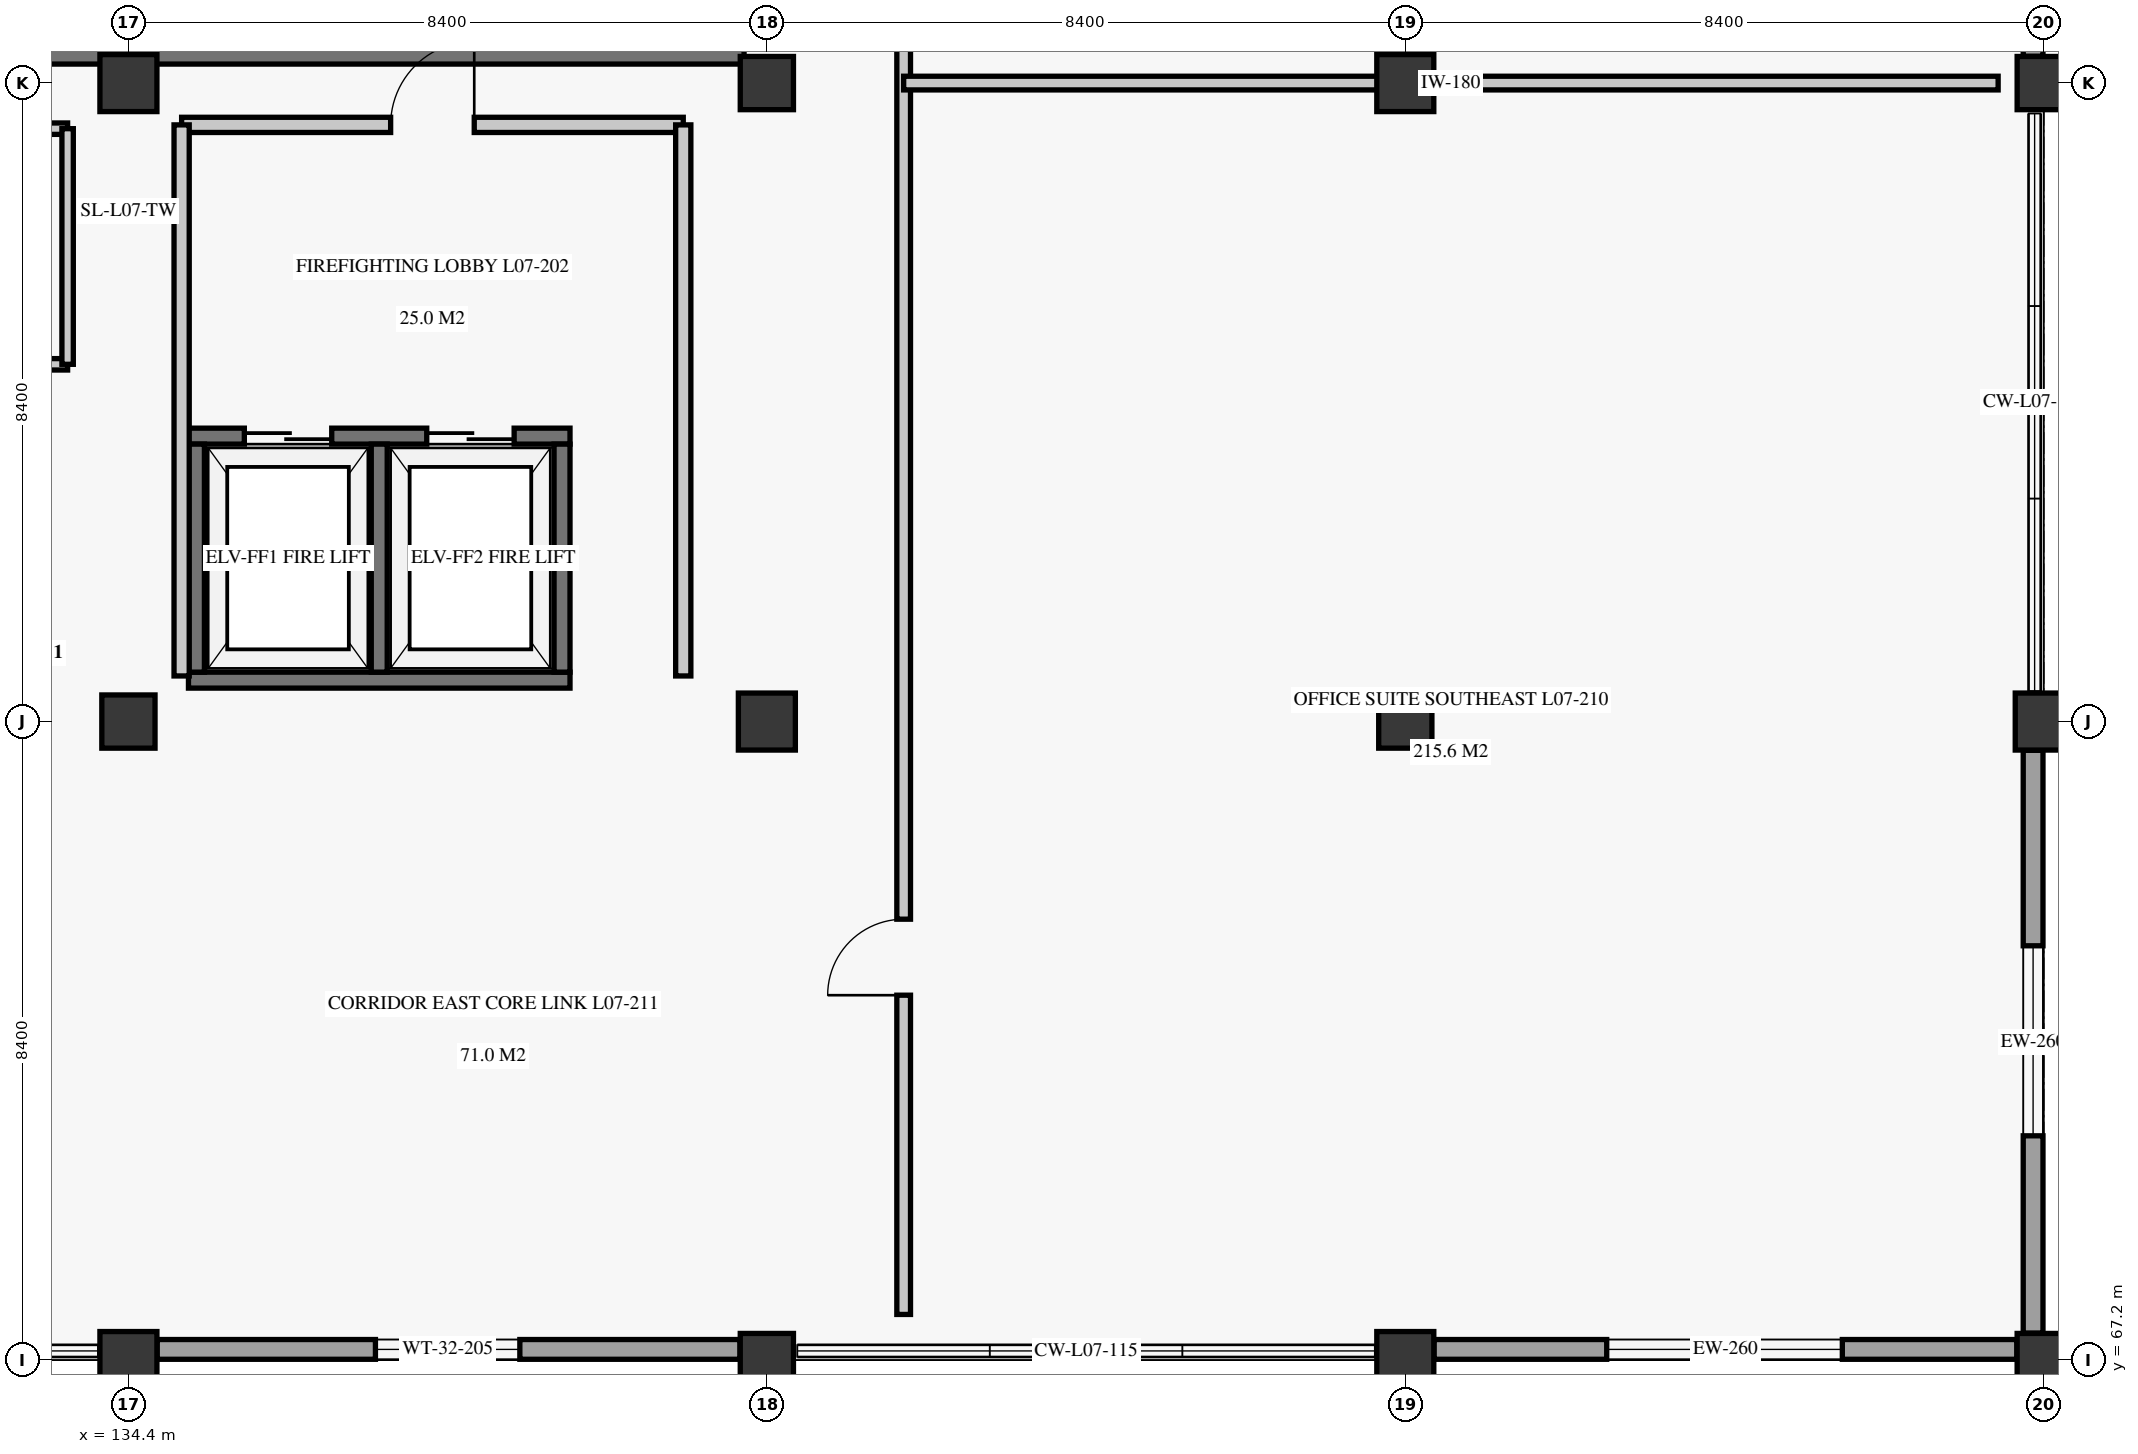
"""IFC4 building model, lengths in metres.
Left out: names, types, materials, properties, quantities, classifications, styles, units other than length and angle.
Written with IfcOpenShell. Run it as: python <this file> out.ifc"""

import sys

from ifc_helpers import new_model, si_unit, direction, frame, frame_2d, origin, origin_2d, place, context, subcontext, project, spatial, rectangle, extrude, element, fill, save


model = new_model("IFC4")
c1 = context("Model", 3, precision=1e-05, world=origin(), true_north=direction((0.0, 1.0)))
c2 = subcontext(c1, "Body", "Model", "MODEL_VIEW")
j1 = project(units=[si_unit("LENGTHUNIT", "METRE"), si_unit("PLANEANGLEUNIT", "RADIAN")], contexts=[c1])
p1 = place(None, origin())
s1 = spatial("IfcSite", under=j1, at=p1, CompositionType="ELEMENT")
p2 = place(p1, origin())
s2 = spatial("IfcBuilding", under=s1, at=p2, CompositionType="ELEMENT")
p3 = place(p2, frame((0.0, 0.0, 30.7)))
s3 = spatial("IfcBuildingStorey", under=s2, at=p3, CompositionType="ELEMENT", Elevation=30.7)
p4 = place(p3, frame((134.4, 67.2, 0.0), z_axis=(0.0, 0.0, 1.0), x_axis=(1.0, 0.0, 0.0)))
e1 = element("IfcColumn", 1, at=p4, inside=s3, PredefinedType="COLUMN", context=c2, shape_type="SweptSolid", body=[
    extrude(rectangle(XDim=0.75, YDim=0.75, at=origin_2d()), origin(), (0.0, 0.0, 1.0), 3.72),
])
p5 = place(p3, frame((134.4, 75.6, 0.0), z_axis=(0.0, 0.0, 1.0), x_axis=(1.0, 0.0, 0.0)))
e2 = element("IfcColumn", 2, at=p5, inside=s3, PredefinedType="COLUMN", context=c2, shape_type="SweptSolid", body=[
    extrude(rectangle(XDim=0.7, YDim=0.7, at=origin_2d()), origin(), (0.0, 0.0, 1.0), 3.72),
])
p6 = place(p3, frame((134.4, 84.0, 0.0), z_axis=(0.0, 0.0, 1.0), x_axis=(1.0, 0.0, 0.0)))
e3 = element("IfcColumn", 3, at=p6, inside=s3, PredefinedType="COLUMN", context=c2, shape_type="SweptSolid", body=[
    extrude(rectangle(XDim=0.75, YDim=0.75, at=origin_2d()), origin(), (0.0, 0.0, 1.0), 3.72),
])
p7 = place(p3, frame((142.8, 67.2, 0.0), z_axis=(0.0, 0.0, 1.0), x_axis=(1.0, 0.0, 0.0)))
e4 = element("IfcColumn", 4, at=p7, inside=s3, PredefinedType="COLUMN", context=c2, shape_type="SweptSolid", body=[
    extrude(rectangle(XDim=0.7, YDim=0.7, at=origin_2d()), origin(), (0.0, 0.0, 1.0), 3.72),
])
p8 = place(p3, frame((142.8, 75.6, 0.0), z_axis=(0.0, 0.0, 1.0), x_axis=(1.0, 0.0, 0.0)))
e5 = element("IfcColumn", 5, at=p8, inside=s3, PredefinedType="COLUMN", context=c2, shape_type="SweptSolid", body=[
    extrude(rectangle(XDim=0.75, YDim=0.75, at=origin_2d()), origin(), (0.0, 0.0, 1.0), 3.72),
])
p9 = place(p3, frame((142.8, 84.0, 0.0), z_axis=(0.0, 0.0, 1.0), x_axis=(1.0, 0.0, 0.0)))
e6 = element("IfcColumn", 6, at=p9, inside=s3, PredefinedType="COLUMN", context=c2, shape_type="SweptSolid", body=[
    extrude(rectangle(XDim=0.7, YDim=0.7, at=origin_2d()), origin(), (0.0, 0.0, 1.0), 3.72),
])
p10 = place(p3, frame((151.2, 67.2, 0.0), z_axis=(0.0, 0.0, 1.0), x_axis=(1.0, 0.0, 0.0)))
e7 = element("IfcColumn", 7, at=p10, inside=s3, PredefinedType="COLUMN", context=c2, shape_type="SweptSolid", body=[
    extrude(rectangle(XDim=0.75, YDim=0.75, at=origin_2d()), origin(), (0.0, 0.0, 1.0), 3.72),
])
p11 = place(p3, frame((151.2, 75.6, 0.0), z_axis=(0.0, 0.0, 1.0), x_axis=(1.0, 0.0, 0.0)))
e8 = element("IfcColumn", 8, at=p11, inside=s3, PredefinedType="COLUMN", context=c2, shape_type="SweptSolid", body=[
    extrude(rectangle(XDim=0.7, YDim=0.7, at=origin_2d()), origin(), (0.0, 0.0, 1.0), 3.72),
])
p12 = place(p3, frame((151.2, 84.0, 0.0), z_axis=(0.0, 0.0, 1.0), x_axis=(1.0, 0.0, 0.0)))
e9 = element("IfcColumn", 9, at=p12, inside=s3, PredefinedType="COLUMN", context=c2, shape_type="SweptSolid", body=[
    extrude(rectangle(XDim=0.75, YDim=0.75, at=origin_2d()), origin(), (0.0, 0.0, 1.0), 3.72),
])
p13 = place(p3, frame((159.6, 67.2, 0.0), z_axis=(0.0, 0.0, 1.0), x_axis=(1.0, 0.0, 0.0)))
e10 = element("IfcColumn", 10, at=p13, inside=s3, PredefinedType="COLUMN", context=c2, shape_type="SweptSolid", body=[
    extrude(rectangle(XDim=0.7, YDim=0.7, at=origin_2d()), origin(), (0.0, 0.0, 1.0), 3.72),
])
p14 = place(p3, frame((159.6, 75.6, 0.0), z_axis=(0.0, 0.0, 1.0), x_axis=(1.0, 0.0, 0.0)))
e11 = element("IfcColumn", 11, at=p14, inside=s3, PredefinedType="COLUMN", context=c2, shape_type="SweptSolid", body=[
    extrude(rectangle(XDim=0.75, YDim=0.75, at=origin_2d()), origin(), (0.0, 0.0, 1.0), 3.72),
])
p15 = place(p3, frame((159.6, 84.0, 0.0), z_axis=(0.0, 0.0, 1.0), x_axis=(1.0, 0.0, 0.0)))
e12 = element("IfcColumn", 12, at=p15, inside=s3, PredefinedType="COLUMN", context=c2, shape_type="SweptSolid", body=[
    extrude(rectangle(XDim=0.7, YDim=0.7, at=origin_2d()), origin(), (0.0, 0.0, 1.0), 3.72),
])
p16 = place(p3, frame((134.778, 67.34, 0.0), z_axis=(0.0, 0.0, 1.0), x_axis=(1.0, 0.0, 0.0)))
e13 = element("IfcWall", 13, at=p16, inside=s3, PredefinedType="SOLIDWALL", context=c2, shape_type="SweptSolid", body=[
    extrude(rectangle(XDim=7.668, YDim=0.26, at=frame_2d((3.834, 0.0))), origin(), (0.0, 0.0, 1.0), 3.04),
])
p17 = place(p16, frame((2.872, 0.0, 0.85)))
e14 = element("IfcOpeningElement", 14, at=p17, cuts=e13, PredefinedType="OPENING", context=c2, shape_type="SweptSolid", body=[
    extrude(rectangle(XDim=1.9, YDim=1.75, at=frame_2d((0.95, 0.875))), frame((0.0, 0.14, 0.0), z_axis=(0.0, -1.0, 0.0), x_axis=(1.0, 0.0, 0.0)), (0.0, 0.0, 1.0), 0.28),
])
p18 = place(p3, frame((151.578, 67.34, 0.0), z_axis=(0.0, 0.0, 1.0), x_axis=(1.0, 0.0, 0.0)))
e15 = element("IfcWall", 15, at=p18, inside=s3, PredefinedType="SOLIDWALL", context=c2, shape_type="SweptSolid", body=[
    extrude(rectangle(XDim=7.668, YDim=0.26, at=frame_2d((3.834, 0.0))), origin(), (0.0, 0.0, 1.0), 3.04),
])
p19 = place(p18, frame((2.272, 0.0, 0.85)))
e16 = element("IfcOpeningElement", 16, at=p19, cuts=e15, PredefinedType="OPENING", context=c2, shape_type="SweptSolid", body=[
    extrude(rectangle(XDim=3.1, YDim=1.85, at=frame_2d((1.55, 0.925))), frame((0.0, 0.14, 0.0), z_axis=(0.0, -1.0, 0.0), x_axis=(1.0, 0.0, 0.0)), (0.0, 0.0, 1.0), 0.28),
])
p20 = place(p3, frame((159.46, 67.554, 0.0), z_axis=(0.0, 0.0, 1.0), x_axis=(0.0, 1.0, 0.0)))
e17 = element("IfcWall", 17, at=p20, inside=s3, PredefinedType="SOLIDWALL", context=c2, shape_type="SweptSolid", body=[
    extrude(rectangle(XDim=7.668, YDim=0.26, at=frame_2d((3.834, 0.0))), origin(), (0.0, 0.0, 1.0), 3.04),
])
p21 = place(p20, frame((2.596, 0.0, 0.85)))
e18 = element("IfcOpeningElement", 18, at=p21, cuts=e17, PredefinedType="OPENING", context=c2, shape_type="SweptSolid", body=[
    extrude(rectangle(XDim=2.5, YDim=1.8, at=frame_2d((1.25, 0.9))), frame((0.0, 0.14, 0.0), z_axis=(0.0, -1.0, 0.0), x_axis=(1.0, 0.0, 0.0)), (0.0, 0.0, 1.0), 0.28),
])
p22 = place(p3, frame((159.46, 84.352, 0.0), z_axis=(0.0, 0.0, 1.0), x_axis=(0.0, 1.0, 0.0)))
e19 = element("IfcWall", 19, at=p22, inside=s3, PredefinedType="SOLIDWALL", context=c2, shape_type="SweptSolid", body=[
    extrude(rectangle(XDim=7.67, YDim=0.26, at=frame_2d((3.835, 0.0))), origin(), (0.0, 0.0, 1.0), 3.04),
])
p23 = place(p22, frame((3.148, 0.0, 0.85)))
e20 = element("IfcOpeningElement", 20, at=p23, cuts=e19, PredefinedType="OPENING", context=c2, shape_type="SweptSolid", body=[
    extrude(rectangle(XDim=1.4, YDim=1.7, at=frame_2d((0.7, 0.85))), frame((0.0, 0.14, 0.0), z_axis=(0.0, -1.0, 0.0), x_axis=(1.0, 0.0, 0.0)), (0.0, 0.0, 1.0), 0.28),
])
p24 = place(p3, frame((132.75, 84.425, 0.0), z_axis=(0.0, 0.0, 1.0), x_axis=(1.0, 0.0, 0.0)))
e21 = element("IfcWall", 21, at=p24, inside=s3, PredefinedType="SHEAR", context=c2, shape_type="SweptSolid", body=[
    extrude(rectangle(XDim=9.75, YDim=0.35, at=frame_2d((4.875, 0.0))), origin(), (0.0, 0.0, 1.0), 3.72),
])
p25 = place(p3, frame((135.19, 76.145, 0.0), z_axis=(0.0, 0.0, 1.0), x_axis=(1.0, 0.0, 0.0)))
e22 = element("IfcWall", 22, at=p25, inside=s3, PredefinedType="SHEAR", context=c2, shape_type="SweptSolid", body=[
    extrude(rectangle(XDim=5.02, YDim=0.21, at=frame_2d((2.51, 0.0))), origin(), (0.0, 0.0, 1.0), 3.72),
])
p26 = place(p3, frame((135.19, 79.355, 0.0), z_axis=(0.0, 0.0, 1.0), x_axis=(1.0, 0.0, 0.0)))
e23 = element("IfcWall", 23, at=p26, inside=s3, PredefinedType="SHEAR", context=c2, shape_type="SweptSolid", body=[
    extrude(rectangle(XDim=5.02, YDim=0.21, at=frame_2d((2.51, 0.0))), origin(), (0.0, 0.0, 1.0), 3.72),
])
p27 = place(p26, frame((0.735, 0.0, 0.0)))
e24 = element("IfcOpeningElement", 24, at=p27, cuts=e23, PredefinedType="OPENING", context=c2, shape_type="SweptSolid", body=[
    extrude(rectangle(XDim=1.15, YDim=2.2, at=frame_2d((0.575, 1.1))), frame((0.0, 0.115, 0.0), z_axis=(0.0, -1.0, 0.0), x_axis=(1.0, 0.0, 0.0)), (0.0, 0.0, 1.0), 0.23),
])
p28 = place(p26, frame((3.135, 0.0, 0.0)))
e25 = element("IfcOpeningElement", 25, at=p28, cuts=e23, PredefinedType="OPENING", context=c2, shape_type="SweptSolid", body=[
    extrude(rectangle(XDim=1.15, YDim=2.2, at=frame_2d((0.575, 1.1))), frame((0.0, 0.115, 0.0), z_axis=(0.0, -1.0, 0.0), x_axis=(1.0, 0.0, 0.0)), (0.0, 0.0, 1.0), 0.23),
])
for number, where, z_axis, x_axis in (
    (26, (135.295, 76.25, 0.0), (0.0, 0.0, 1.0), (0.0, 1.0, 0.0)),
    (27, (140.105, 76.25, 0.0), (0.0, 0.0, 1.0), (0.0, 1.0, 0.0)),
    (28, (137.7, 76.25, 0.0), (0.0, 0.0, 1.0), (0.0, 1.0, 0.0)),
):
    element("IfcWall", number, at=place(p3, frame(where, z_axis=z_axis, x_axis=x_axis)), inside=s3, PredefinedType="SHEAR", context=c2, shape_type="SweptSolid", body=[
        extrude(rectangle(XDim=3.0, YDim=0.21, at=frame_2d((1.5, 0.0))), origin(), (0.0, 0.0, 1.0), 3.72),
    ])
p29 = place(p3, frame((135.1, 83.45, 0.0), z_axis=(0.0, 0.0, 1.0), x_axis=(1.0, 0.0, 0.0)))
e29 = element("IfcWall", 29, at=p29, inside=s3, PredefinedType="PARTITIONING", context=c2, shape_type="SweptSolid", body=[
    extrude(rectangle(XDim=6.6, YDim=0.2, at=frame_2d((3.3, 0.0))), origin(), (0.0, 0.0, 1.0), 3.34),
])
p30 = place(p29, frame((2.75, 0.0, 0.0)))
e30 = element("IfcOpeningElement", 30, at=p30, cuts=e29, PredefinedType="OPENING", context=c2, shape_type="SweptSolid", body=[
    extrude(rectangle(XDim=1.1, YDim=2.2, at=frame_2d((0.55, 1.1))), frame((0.0, 0.11, 0.0), z_axis=(0.0, -1.0, 0.0), x_axis=(1.0, 0.0, 0.0)), (0.0, 0.0, 1.0), 0.22),
])
for number, where, z_axis, x_axis in (
    (31, (135.1, 76.2, 0.0), (0.0, 0.0, 1.0), (0.0, 1.0, 0.0)),
    (32, (141.7, 76.2, 0.0), (0.0, 0.0, 1.0), (0.0, 1.0, 0.0)),
):
    element("IfcWall", number, at=place(p3, frame(where, z_axis=z_axis, x_axis=x_axis)), inside=s3, PredefinedType="PARTITIONING", context=c2, shape_type="SweptSolid", body=[
        extrude(rectangle(XDim=7.25, YDim=0.2, at=frame_2d((3.625, 0.0))), origin(), (0.0, 0.0, 1.0), 3.34),
    ])
p31 = place(p3, frame((129.1, 80.3, 0.0), z_axis=(0.0, 0.0, 1.0), x_axis=(1.0, 0.0, 0.0)))
e33 = element("IfcWall", 33, at=p31, inside=s3, PredefinedType="PARTITIONING", context=c2, shape_type="SweptSolid", body=[
    extrude(rectangle(XDim=4.5, YDim=0.15, at=frame_2d((2.25, 0.0))), origin(), (0.0, 0.0, 1.0), 3.34),
])
p32 = place(p31, frame((1.65, 0.0, 0.0)))
e34 = element("IfcOpeningElement", 34, at=p32, cuts=e33, PredefinedType="OPENING", context=c2, shape_type="SweptSolid", body=[
    extrude(rectangle(XDim=1.0, YDim=2.1, at=frame_2d((0.5, 1.05))), frame((0.0, 0.085, 0.0), z_axis=(0.0, -1.0, 0.0), x_axis=(1.0, 0.0, 0.0)), (0.0, 0.0, 1.0), 0.17),
])
p33 = place(p3, frame((129.1, 83.4, 0.0), z_axis=(0.0, 0.0, 1.0), x_axis=(1.0, 0.0, 0.0)))
e35 = element("IfcWall", 35, at=p33, inside=s3, PredefinedType="PARTITIONING", context=c2, shape_type="SweptSolid", body=[
    extrude(rectangle(XDim=4.5, YDim=0.15, at=frame_2d((2.25, 0.0))), origin(), (0.0, 0.0, 1.0), 3.34),
])
p34 = place(p3, frame((133.6, 80.3, 0.0), z_axis=(0.0, 0.0, 1.0), x_axis=(0.0, 1.0, 0.0)))
e36 = element("IfcWall", 36, at=p34, inside=s3, PredefinedType="PARTITIONING", context=c2, shape_type="SweptSolid", body=[
    extrude(rectangle(XDim=3.1, YDim=0.15, at=frame_2d((1.55, 0.0))), origin(), (0.0, 0.0, 1.0), 3.34),
])
p35 = place(p3, frame((144.6, 67.8, 0.0), z_axis=(0.0, 0.0, 1.0), x_axis=(0.0, 1.0, 0.0)))
e37 = element("IfcWall", 37, at=p35, inside=s3, PredefinedType="PARTITIONING", context=c2, shape_type="SweptSolid", body=[
    extrude(rectangle(XDim=32.4, YDim=0.18, at=frame_2d((16.2, 0.0))), origin(), (0.0, 0.0, 1.0), 3.34),
])
p36 = place(p35, frame((4.2, 0.0, 0.0)))
e38 = element("IfcOpeningElement", 38, at=p36, cuts=e37, PredefinedType="OPENING", context=c2, shape_type="SweptSolid", body=[
    extrude(rectangle(XDim=1.0, YDim=2.15, at=frame_2d((0.5, 1.075))), frame((0.0, 0.1, 0.0), z_axis=(0.0, -1.0, 0.0), x_axis=(1.0, 0.0, 0.0)), (0.0, 0.0, 1.0), 0.2),
])
p37 = place(p35, frame((21.4, 0.0, 0.0)))
e39 = element("IfcOpeningElement", 39, at=p37, cuts=e37, PredefinedType="OPENING", context=c2, shape_type="SweptSolid", body=[
    extrude(rectangle(XDim=1.0, YDim=2.15, at=frame_2d((0.5, 1.075))), frame((0.0, 0.1, 0.0), z_axis=(0.0, -1.0, 0.0), x_axis=(1.0, 0.0, 0.0)), (0.0, 0.0, 1.0), 0.2),
])
p38 = place(p3, frame((144.6, 84.0, 0.0), z_axis=(0.0, 0.0, 1.0), x_axis=(1.0, 0.0, 0.0)))
e40 = element("IfcWall", 40, at=p38, inside=s3, PredefinedType="PARTITIONING", context=c2, shape_type="SweptSolid", body=[
    extrude(rectangle(XDim=14.4, YDim=0.18, at=frame_2d((7.2, 0.0))), origin(), (0.0, 0.0, 1.0), 3.34),
])
p39 = place(p17, origin())
e41 = element("IfcWindow", 41, at=p39, inside=s3, PartitioningType="SINGLE_PANEL", PredefinedType="WINDOW", context=c2, shape_type="SweptSolid", body=[
    extrude(rectangle(XDim=1.9, YDim=1.75, at=frame_2d((0.95, 0.875))), frame((0.0, 0.03, 0.0), z_axis=(0.0, -1.0, 0.0), x_axis=(1.0, 0.0, 0.0)), (0.0, 0.0, 1.0), 0.06),
])
fill(e14, e41)
p40 = place(p19, origin())
e42 = element("IfcWindow", 42, at=p40, inside=s3, PartitioningType="SINGLE_PANEL", PredefinedType="WINDOW", context=c2, shape_type="SweptSolid", body=[
    extrude(rectangle(XDim=3.1, YDim=1.85, at=frame_2d((1.55, 0.925))), frame((0.0, 0.03, 0.0), z_axis=(0.0, -1.0, 0.0), x_axis=(1.0, 0.0, 0.0)), (0.0, 0.0, 1.0), 0.06),
])
fill(e16, e42)
p41 = place(p21, origin())
e43 = element("IfcWindow", 43, at=p41, inside=s3, PartitioningType="SINGLE_PANEL", PredefinedType="WINDOW", context=c2, shape_type="SweptSolid", body=[
    extrude(rectangle(XDim=2.5, YDim=1.8, at=frame_2d((1.25, 0.9))), frame((0.0, 0.03, 0.0), z_axis=(0.0, -1.0, 0.0), x_axis=(1.0, 0.0, 0.0)), (0.0, 0.0, 1.0), 0.06),
])
fill(e18, e43)
p42 = place(p27, origin())
e44 = element("IfcDoor", 44, at=p42, inside=s3, OperationType="DOUBLE_DOOR_SLIDING", PredefinedType="DOOR", context=c2, shape_type="SweptSolid", body=[
    extrude(rectangle(XDim=1.15, YDim=2.2, at=frame_2d((0.575, 1.1))), frame((0.0, 0.025, 0.0), z_axis=(0.0, -1.0, 0.0), x_axis=(1.0, 0.0, 0.0)), (0.0, 0.0, 1.0), 0.05),
])
fill(e24, e44)
p43 = place(p28, origin())
e45 = element("IfcDoor", 45, at=p43, inside=s3, OperationType="DOUBLE_DOOR_SLIDING", PredefinedType="DOOR", context=c2, shape_type="SweptSolid", body=[
    extrude(rectangle(XDim=1.15, YDim=2.2, at=frame_2d((0.575, 1.1))), frame((0.0, 0.025, 0.0), z_axis=(0.0, -1.0, 0.0), x_axis=(1.0, 0.0, 0.0)), (0.0, 0.0, 1.0), 0.05),
])
fill(e25, e45)
p44 = place(p30, origin())
e46 = element("IfcDoor", 46, at=p44, inside=s3, OperationType="SINGLE_SWING_RIGHT", PredefinedType="DOOR", context=c2, shape_type="SweptSolid", body=[
    extrude(rectangle(XDim=1.1, YDim=2.2, at=frame_2d((0.55, 1.1))), frame((0.0, 0.025, 0.0), z_axis=(0.0, -1.0, 0.0), x_axis=(1.0, 0.0, 0.0)), (0.0, 0.0, 1.0), 0.05),
])
fill(e30, e46)
p45 = place(p36, origin())
e47 = element("IfcDoor", 47, at=p45, inside=s3, OperationType="SINGLE_SWING_LEFT", PredefinedType="DOOR", context=c2, shape_type="SweptSolid", body=[
    extrude(rectangle(XDim=1.0, YDim=2.15, at=frame_2d((0.5, 1.075))), frame((0.0, 0.025, 0.0), z_axis=(0.0, -1.0, 0.0), x_axis=(1.0, 0.0, 0.0)), (0.0, 0.0, 1.0), 0.05),
])
fill(e38, e47)
save(model, sys.argv[1])
